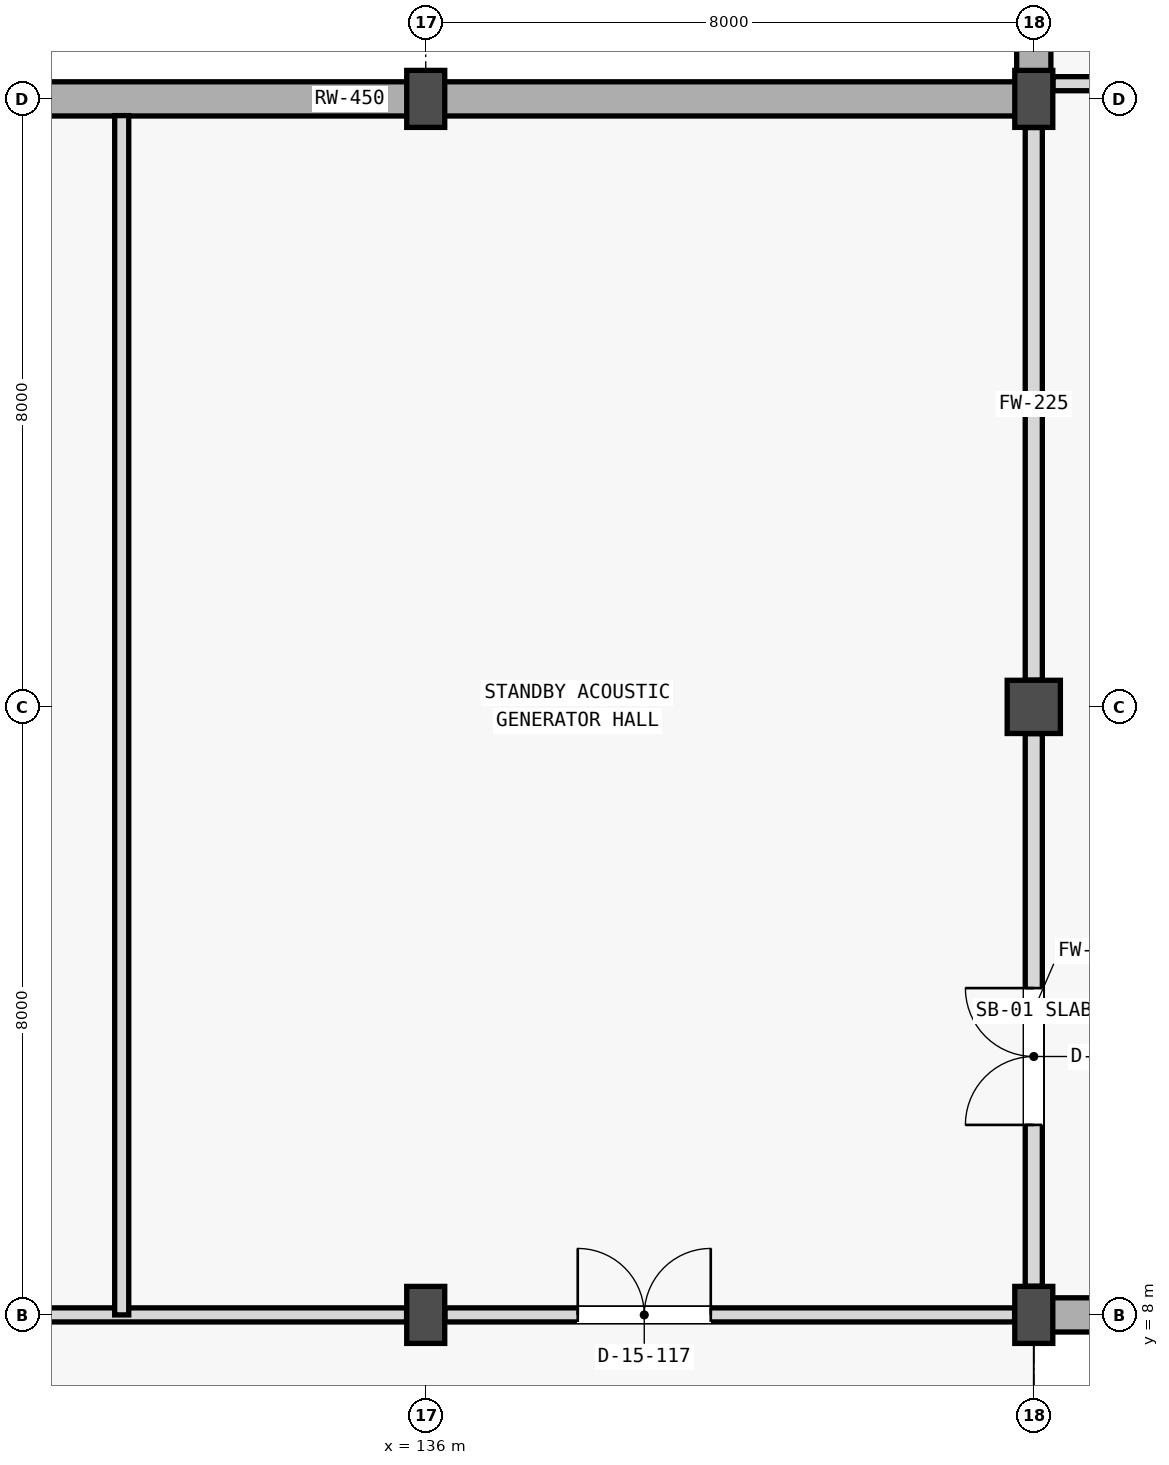
"""IFC4 building model, lengths in metres.
Left out: names, types, materials, properties, quantities, classifications, styles, units other than length and angle.
Written with IfcOpenShell. Run it as: python <this file> out.ifc"""

import sys

from ifc_helpers import new_model, si_unit, direction, frame, frame_2d, origin, origin_2d, place, context, subcontext, project, spatial, rectangle, extrude, element, fill, save


model = new_model("IFC4")
c1 = context("Model", 3, precision=1e-05, world=origin(), true_north=direction((0.0, 1.0)))
c2 = subcontext(c1, "Body", "Model", "MODEL_VIEW")
j1 = project(units=[si_unit("LENGTHUNIT", "METRE"), si_unit("PLANEANGLEUNIT", "RADIAN")], contexts=[c1])
p1 = place(None, origin())
s1 = spatial("IfcSite", under=j1, at=p1, CompositionType="ELEMENT")
p2 = place(p1, origin())
s2 = spatial("IfcBuilding", under=s1, at=p2, CompositionType="ELEMENT")
p3 = place(p2, frame((0.0, 0.0, -4.8)))
s3 = spatial("IfcBuildingStorey", under=s2, at=p3, CompositionType="ELEMENT", Elevation=-4.8)
for number, where, z_axis, x_axis in (
    (1, (136.0, 8.0, 0.0), (0.0, 0.0, 1.0), (1.0, 0.0, 0.0)),
    (2, (136.0, 24.0, 0.0), (0.0, 0.0, 1.0), (1.0, 0.0, 0.0)),
    (3, (144.0, 8.0, 0.0), (0.0, 0.0, 1.0), (1.0, 0.0, 0.0)),
    (4, (144.0, 24.0, 0.0), (0.0, 0.0, 1.0), (1.0, 0.0, 0.0)),
):
    element("IfcColumn", number, at=place(p3, frame(where, z_axis=z_axis, x_axis=x_axis)), inside=s3, PredefinedType="COLUMN", context=c2, shape_type="SweptSolid", body=[
        extrude(rectangle(XDim=0.5, YDim=0.75, at=origin_2d()), origin(), (0.0, 0.0, 1.0), 4.5),
    ])
p4 = place(p3, frame((144.0, 16.0, 0.0), z_axis=(0.0, 0.0, 1.0), x_axis=(1.0, 0.0, 0.0)))
e5 = element("IfcColumn", 5, at=p4, inside=s3, PredefinedType="COLUMN", context=c2, shape_type="SweptSolid", body=[
    extrude(rectangle(XDim=0.7, YDim=0.7, at=origin_2d()), origin(), (0.0, 0.0, 1.0), 4.5),
])
p5 = place(p3, frame((96.0, 24.0, 0.0), z_axis=(0.0, 0.0, 1.0), x_axis=(1.0, 0.0, 0.0)))
e6 = element("IfcWall", 6, at=p5, inside=s3, PredefinedType="SOLIDWALL", context=c2, shape_type="SweptSolid", body=[
    extrude(rectangle(XDim=48.0, YDim=0.45, at=frame_2d((24.0, 0.0))), origin(), (0.0, 0.0, 1.0), 4.47),
])
p6 = place(p3, frame((144.0, 24.0, 0.0), z_axis=(0.0, 0.0, 1.0), x_axis=(0.0, 1.0, 0.0)))
e7 = element("IfcWall", 7, at=p6, inside=s3, PredefinedType="SOLIDWALL", context=c2, shape_type="SweptSolid", body=[
    extrude(rectangle(XDim=60.0, YDim=0.45, at=frame_2d((30.0, 0.0))), origin(), (0.0, 0.0, 1.0), 4.47),
])
p7 = place(p3, frame((144.0, 8.0, 0.0), z_axis=(0.0, 0.0, 1.0), x_axis=(1.0, 0.0, 0.0)))
e8 = element("IfcWall", 8, at=p7, inside=s3, PredefinedType="SOLIDWALL", context=c2, shape_type="SweptSolid", body=[
    extrude(rectangle(XDim=24.0, YDim=0.45, at=frame_2d((12.0, 0.0))), origin(), (0.0, 0.0, 1.0), 4.47),
])
p8 = place(p3, frame((144.0, 8.377, 0.0), z_axis=(0.0, 0.0, 1.0), x_axis=(0.0, 1.0, 0.0)))
e9 = element("IfcWall", 9, at=p8, inside=s3, PredefinedType="STANDARD", context=c2, shape_type="SweptSolid", body=[
    extrude(rectangle(XDim=7.271, YDim=0.225, at=frame_2d((3.635, 0.0))), origin(), (0.0, 0.0, 1.0), 3.9),
])
p9 = place(p8, frame((2.123, 0.0, 0.0)))
e10 = element("IfcOpeningElement", 10, at=p9, cuts=e9, PredefinedType="OPENING", context=c2, shape_type="SweptSolid", body=[
    extrude(rectangle(XDim=1.8, YDim=2.3, at=frame_2d((0.9, 1.15))), frame((0.0, 0.123, 0.0), z_axis=(0.0, -1.0, 0.0), x_axis=(1.0, 0.0, 0.0)), (0.0, 0.0, 1.0), 0.245),
])
p10 = place(p3, frame((144.0, 16.352, 0.0), z_axis=(0.0, 0.0, 1.0), x_axis=(0.0, 1.0, 0.0)))
e11 = element("IfcWall", 11, at=p10, inside=s3, PredefinedType="STANDARD", context=c2, shape_type="SweptSolid", body=[
    extrude(rectangle(XDim=7.271, YDim=0.225, at=frame_2d((3.635, 0.0))), origin(), (0.0, 0.0, 1.0), 3.9),
])
p11 = place(p3, frame((128.252, 8.0, 0.0), z_axis=(0.0, 0.0, 1.0), x_axis=(1.0, 0.0, 0.0)))
e12 = element("IfcWall", 12, at=p11, inside=s3, PredefinedType="STANDARD", context=c2, shape_type="SweptSolid", body=[
    extrude(rectangle(XDim=7.496, YDim=0.185, at=frame_2d((3.748, 0.0))), origin(), (0.0, 0.0, 1.0), 3.65),
])
p12 = place(p3, frame((136.252, 8.0, 0.0), z_axis=(0.0, 0.0, 1.0), x_axis=(1.0, 0.0, 0.0)))
e13 = element("IfcWall", 13, at=p12, inside=s3, PredefinedType="STANDARD", context=c2, shape_type="SweptSolid", body=[
    extrude(rectangle(XDim=7.496, YDim=0.185, at=frame_2d((3.748, 0.0))), origin(), (0.0, 0.0, 1.0), 3.65),
])
p13 = place(p12, frame((1.748, 0.0, 0.0)))
e14 = element("IfcOpeningElement", 14, at=p13, cuts=e13, PredefinedType="OPENING", context=c2, shape_type="SweptSolid", body=[
    extrude(rectangle(XDim=1.75, YDim=2.35, at=frame_2d((0.875, 1.175))), frame((0.0, 0.103, 0.0), z_axis=(0.0, -1.0, 0.0), x_axis=(1.0, 0.0, 0.0)), (0.0, 0.0, 1.0), 0.205),
])
p14 = place(p3, frame((132.0, 8.0, 0.0), z_axis=(0.0, 0.0, 1.0), x_axis=(0.0, 1.0, 0.0)))
e15 = element("IfcWall", 15, at=p14, inside=s3, PredefinedType="STANDARD", context=c2, shape_type="SweptSolid", body=[
    extrude(rectangle(XDim=15.78, YDim=0.185, at=frame_2d((7.89, 0.0))), origin(), (0.0, 0.0, 1.0), 3.65),
])
p15 = place(p3, frame((144.252, 24.2, 0.0), z_axis=(0.0, 0.0, 1.0), x_axis=(1.0, 0.0, 0.0)))
e16 = element("IfcWall", 16, at=p15, inside=s3, PredefinedType="STANDARD", context=c2, shape_type="SweptSolid", body=[
    extrude(rectangle(XDim=7.321, YDim=0.185, at=frame_2d((3.661, 0.0))), origin(), (0.0, 0.0, 1.0), 3.7),
])
p16 = place(p9, origin())
e17 = element("IfcDoor", 17, at=p16, inside=s3, OperationType="DOUBLE_DOOR_SINGLE_SWING", PredefinedType="DOOR", context=c2, shape_type="SweptSolid", body=[
    extrude(rectangle(XDim=1.8, YDim=2.3, at=frame_2d((0.9, 1.15))), frame((0.0, 0.025, 0.0), z_axis=(0.0, -1.0, 0.0), x_axis=(1.0, 0.0, 0.0)), (0.0, 0.0, 1.0), 0.05),
])
fill(e10, e17)
p17 = place(p13, origin())
e18 = element("IfcDoor", 18, at=p17, inside=s3, OperationType="DOUBLE_DOOR_SINGLE_SWING", PredefinedType="DOOR", context=c2, shape_type="SweptSolid", body=[
    extrude(rectangle(XDim=1.75, YDim=2.35, at=frame_2d((0.875, 1.175))), frame((0.0, 0.025, 0.0), z_axis=(0.0, -1.0, 0.0), x_axis=(1.0, 0.0, 0.0)), (0.0, 0.0, 1.0), 0.05),
])
fill(e14, e18)
save(model, sys.argv[1])
